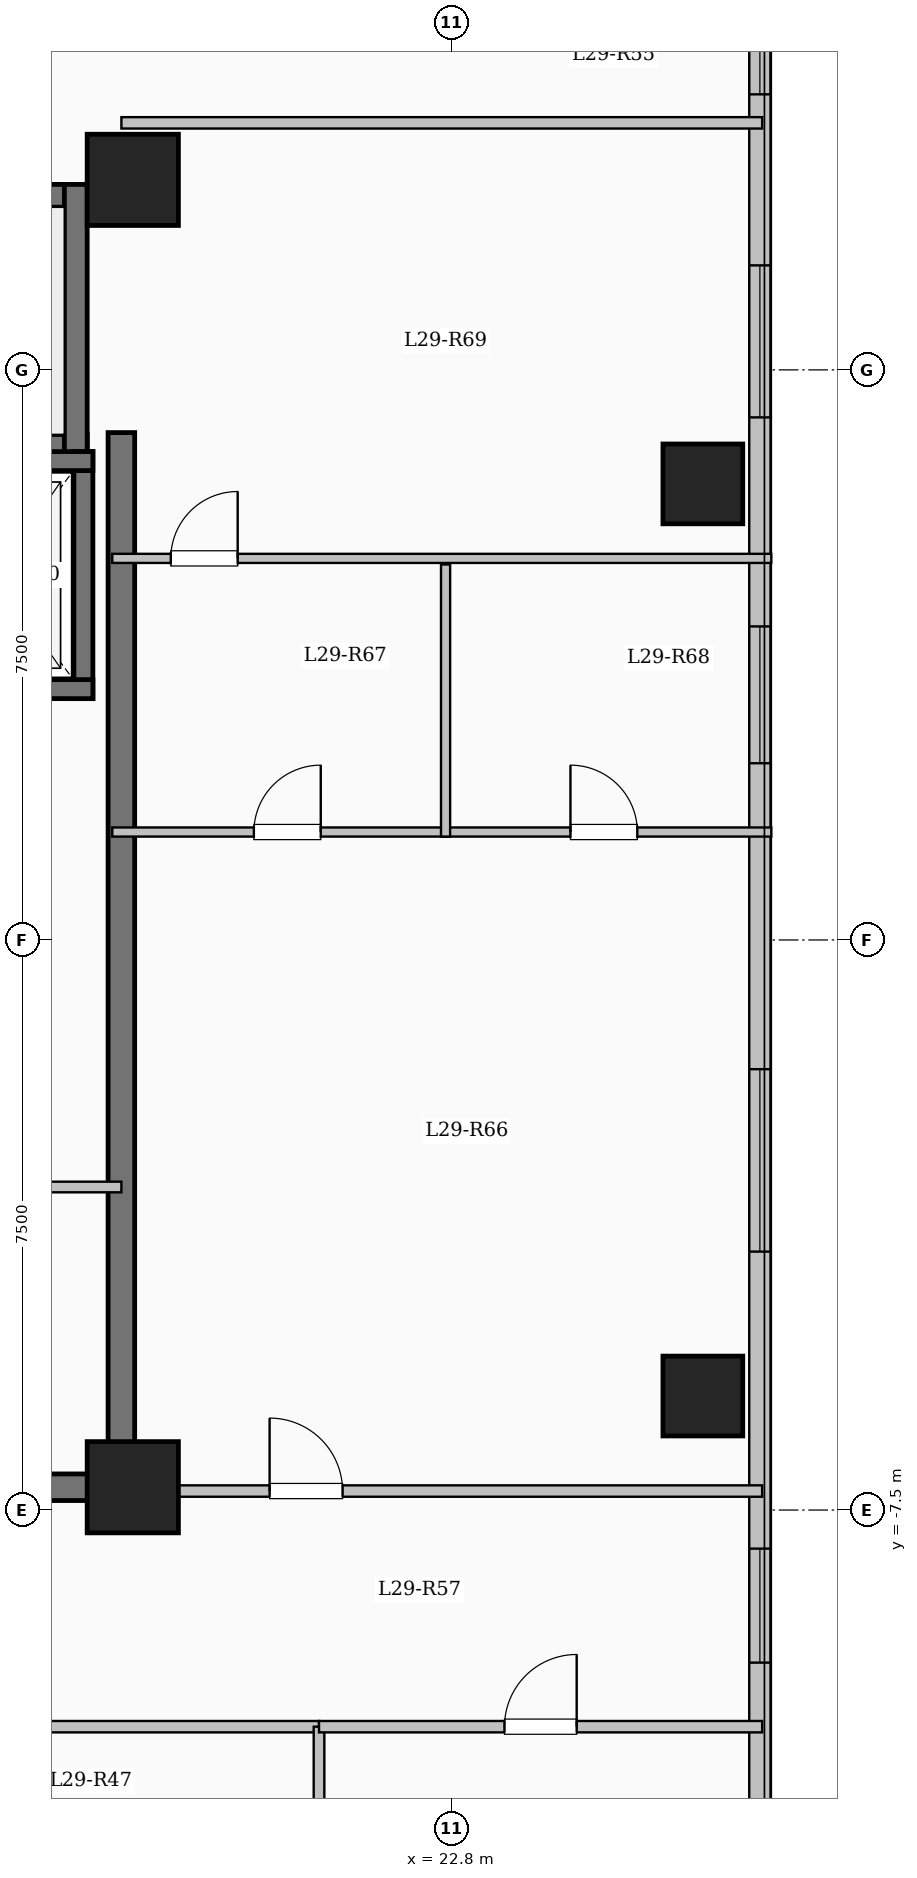
"""IFC4 building model, lengths in metres.
Left out: names, types, materials, properties, quantities, classifications, styles, units other than length and angle.
Written with IfcOpenShell. Run it as: python <this file> out.ifc"""

import sys

from ifc_helpers import new_model, si_unit, direction, frame, frame_2d, origin, origin_2d, place, context, subcontext, project, spatial, rectangle, extrude, element, fill, save


model = new_model("IFC4")
c1 = context("Model", 3, precision=1e-05, world=origin(), true_north=direction((0.0, 1.0)))
c2 = subcontext(c1, "Body", "Model", "MODEL_VIEW")
j1 = project(units=[si_unit("LENGTHUNIT", "METRE"), si_unit("PLANEANGLEUNIT", "RADIAN")], contexts=[c1])
p1 = place(None, origin())
s1 = spatial("IfcSite", under=j1, at=p1, CompositionType="ELEMENT")
p2 = place(p1, origin())
s2 = spatial("IfcBuilding", under=s1, at=p2, CompositionType="ELEMENT")
p3 = place(p2, frame((0.0, 0.0, 108.45)))
s3 = spatial("IfcBuildingStorey", under=s2, at=p3, CompositionType="ELEMENT", Elevation=108.45)
for number, where, z_axis, x_axis in (
    (1, (18.6, -7.2, 0.0), (0.0, 0.0, 1.0), (1.0, 0.0, 0.0)),
    (2, (18.6, 10.0, 0.0), (0.0, 0.0, 1.0), (1.0, 0.0, 0.0)),
):
    element("IfcColumn", number, at=place(p3, frame(where, z_axis=z_axis, x_axis=x_axis)), inside=s3, PredefinedType="COLUMN", context=c2, shape_type="SweptSolid", body=[
        extrude(rectangle(XDim=1.2, YDim=1.2, at=origin_2d()), origin(), (0.0, 0.0, 1.0), 3.35),
    ])
for number, where, z_axis, x_axis in (
    (3, (26.1, -6.0, 0.0), (0.0, 0.0, 1.0), (1.0, 0.0, 0.0)),
    (4, (26.1, 6.0, 0.0), (0.0, 0.0, 1.0), (1.0, 0.0, 0.0)),
):
    element("IfcColumn", number, at=place(p3, frame(where, z_axis=z_axis, x_axis=x_axis)), inside=s3, PredefinedType="COLUMN", context=c2, shape_type="SweptSolid", body=[
        extrude(rectangle(XDim=1.05, YDim=1.05, at=origin_2d()), origin(), (0.0, 0.0, 1.0), 3.35),
    ])
p4 = place(p3, frame((26.85, 17.85, 0.0), z_axis=(0.0, 0.0, 1.0), x_axis=(0.0, -1.0, 0.0)))
e5 = element("IfcWall", 5, at=p4, inside=s3, PredefinedType="SOLIDWALL", context=c2, shape_type="SweptSolid", body=[
    extrude(rectangle(XDim=35.7, YDim=0.28, at=frame_2d((17.85, 0.0))), origin(), (0.0, 0.0, 1.0), 3.1),
])
p5 = place(p4, frame((1.675, 0.0, 0.9)))
e6 = element("IfcOpeningElement", 6, at=p5, cuts=e5, PredefinedType="OPENING", context=c2, shape_type="SweptSolid", body=[
    extrude(rectangle(XDim=2.0, YDim=1.7, at=frame_2d((1.0, 0.85))), frame((0.0, 0.15, 0.0), z_axis=(0.0, -1.0, 0.0), x_axis=(1.0, 0.0, 0.0)), (0.0, 0.0, 1.0), 0.3),
])
p6 = place(p4, frame((5.725, 0.0, 0.95)))
e7 = element("IfcOpeningElement", 7, at=p6, cuts=e5, PredefinedType="OPENING", context=c2, shape_type="SweptSolid", body=[
    extrude(rectangle(XDim=1.0, YDim=1.5, at=frame_2d((0.5, 0.75))), frame((0.0, 0.15, 0.0), z_axis=(0.0, -1.0, 0.0), x_axis=(1.0, 0.0, 0.0)), (0.0, 0.0, 1.0), 0.3),
])
p7 = place(p4, frame((8.975, 0.0, 0.9)))
e8 = element("IfcOpeningElement", 8, at=p7, cuts=e5, PredefinedType="OPENING", context=c2, shape_type="SweptSolid", body=[
    extrude(rectangle(XDim=2.0, YDim=1.7, at=frame_2d((1.0, 0.85))), frame((0.0, 0.15, 0.0), z_axis=(0.0, -1.0, 0.0), x_axis=(1.0, 0.0, 0.0)), (0.0, 0.0, 1.0), 0.3),
])
p8 = place(p4, frame((13.725, 0.0, 0.9)))
e9 = element("IfcOpeningElement", 9, at=p8, cuts=e5, PredefinedType="OPENING", context=c2, shape_type="SweptSolid", body=[
    extrude(rectangle(XDim=1.8, YDim=1.65, at=frame_2d((0.9, 0.825))), frame((0.0, 0.15, 0.0), z_axis=(0.0, -1.0, 0.0), x_axis=(1.0, 0.0, 0.0)), (0.0, 0.0, 1.0), 0.3),
])
p9 = place(p4, frame((19.55, 0.0, 0.9)))
e10 = element("IfcOpeningElement", 10, at=p9, cuts=e5, PredefinedType="OPENING", context=c2, shape_type="SweptSolid", body=[
    extrude(rectangle(XDim=2.4, YDim=1.8, at=frame_2d((1.2, 0.9))), frame((0.0, 0.15, 0.0), z_axis=(0.0, -1.0, 0.0), x_axis=(1.0, 0.0, 0.0)), (0.0, 0.0, 1.0), 0.3),
])
p10 = place(p4, frame((25.857, 0.0, 0.9)))
e11 = element("IfcOpeningElement", 11, at=p10, cuts=e5, PredefinedType="OPENING", context=c2, shape_type="SweptSolid", body=[
    extrude(rectangle(XDim=1.5, YDim=1.65, at=frame_2d((0.75, 0.825))), frame((0.0, 0.15, 0.0), z_axis=(0.0, -1.0, 0.0), x_axis=(1.0, 0.0, 0.0)), (0.0, 0.0, 1.0), 0.3),
])
p11 = place(p4, frame((30.75, 0.0, 0.9)))
e12 = element("IfcOpeningElement", 12, at=p11, cuts=e5, PredefinedType="OPENING", context=c2, shape_type="SweptSolid", body=[
    extrude(rectangle(XDim=2.4, YDim=1.8, at=frame_2d((1.2, 0.9))), frame((0.0, 0.15, 0.0), z_axis=(0.0, -1.0, 0.0), x_axis=(1.0, 0.0, 0.0)), (0.0, 0.0, 1.0), 0.3),
])
p12 = place(p3, frame((10.0, 9.79, 0.0), z_axis=(0.0, 0.0, 1.0), x_axis=(1.0, 0.0, 0.0)))
e13 = element("IfcWall", 13, at=p12, inside=s3, PredefinedType="SHEAR", context=c2, shape_type="SweptSolid", body=[
    extrude(rectangle(XDim=8.0, YDim=0.3, at=frame_2d((4.0, 0.0))), origin(), (0.0, 0.0, 1.0), 3.35),
])
p13 = place(p3, frame((10.0, 6.5, 0.0), z_axis=(0.0, 0.0, 1.0), x_axis=(1.0, 0.0, 0.0)))
e14 = element("IfcWall", 14, at=p13, inside=s3, PredefinedType="SHEAR", context=c2, shape_type="SweptSolid", body=[
    extrude(rectangle(XDim=8.0, YDim=0.3, at=frame_2d((4.0, 0.0))), origin(), (0.0, 0.0, 1.0), 3.35),
])
p14 = place(p13, frame((0.55, 0.0, 0.0)))
e15 = element("IfcOpeningElement", 15, at=p14, cuts=e14, PredefinedType="OPENING", context=c2, shape_type="SweptSolid", body=[
    extrude(rectangle(XDim=1.0, YDim=2.15, at=frame_2d((0.5, 1.075))), frame((0.0, 0.16, 0.0), z_axis=(0.0, -1.0, 0.0), x_axis=(1.0, 0.0, 0.0)), (0.0, 0.0, 1.0), 0.32),
])
p15 = place(p3, frame((17.85, 6.35, 0.0), z_axis=(0.0, 0.0, 1.0), x_axis=(0.0, 1.0, 0.0)))
e16 = element("IfcWall", 16, at=p15, inside=s3, PredefinedType="SHEAR", context=c2, shape_type="SweptSolid", body=[
    extrude(rectangle(XDim=3.59, YDim=0.3, at=frame_2d((1.795, 0.0))), origin(), (0.0, 0.0, 1.0), 3.35),
])
p16 = place(p3, frame((17.95, 3.175, 0.0), z_axis=(0.0, 0.0, 1.0), x_axis=(0.0, 1.0, 0.0)))
e17 = element("IfcWall", 17, at=p16, inside=s3, PredefinedType="SHEAR", context=c2, shape_type="SweptSolid", body=[
    extrude(rectangle(XDim=3.25, YDim=0.25, at=frame_2d((1.625, 0.0))), origin(), (0.0, 0.0, 1.0), 3.35),
])
for number, where, z_axis, x_axis in (
    (18, (15.525, 3.3, 0.0), (0.0, 0.0, 1.0), (1.0, 0.0, 0.0)),
    (19, (15.525, 6.3, 0.0), (0.0, 0.0, 1.0), (1.0, 0.0, 0.0)),
):
    element("IfcWall", number, at=place(p3, frame(where, z_axis=z_axis, x_axis=x_axis)), inside=s3, PredefinedType="SHEAR", context=c2, shape_type="SweptSolid", body=[
        extrude(rectangle(XDim=2.55, YDim=0.25, at=frame_2d((1.275, 0.0))), origin(), (0.0, 0.0, 1.0), 3.35),
    ])
p17 = place(p3, frame((18.45, -7.375, 0.0), z_axis=(0.0, 0.0, 1.0), x_axis=(0.0, 1.0, 0.0)))
e20 = element("IfcWall", 20, at=p17, inside=s3, PredefinedType="SHEAR", context=c2, shape_type="SweptSolid", body=[
    extrude(rectangle(XDim=14.05, YDim=0.35, at=frame_2d((7.025, 0.0))), origin(), (0.0, 0.0, 1.0), 3.35),
])
p18 = place(p3, frame((10.075, -7.2, 0.0), z_axis=(0.0, 0.0, 1.0), x_axis=(1.0, 0.0, 0.0)))
e21 = element("IfcWall", 21, at=p18, inside=s3, PredefinedType="SHEAR", context=c2, shape_type="SweptSolid", body=[
    extrude(rectangle(XDim=8.55, YDim=0.35, at=frame_2d((4.275, 0.0))), origin(), (0.0, 0.0, 1.0), 3.35),
])
p19 = place(p3, frame((15.4, -3.25, 0.0), z_axis=(0.0, 0.0, 1.0), x_axis=(1.0, 0.0, 0.0)))
e22 = element("IfcWall", 22, at=p19, inside=s3, PredefinedType="PARTITIONING", context=c2, shape_type="SweptSolid", body=[
    extrude(rectangle(XDim=3.05, YDim=0.14, at=frame_2d((1.525, 0.0))), origin(), (0.0, 0.0, 1.0), 3.1),
])
p20 = place(p19, frame((1.05, 0.0, 0.0)))
e23 = element("IfcOpeningElement", 23, at=p20, cuts=e22, PredefinedType="OPENING", context=c2, shape_type="SweptSolid", body=[
    extrude(rectangle(XDim=0.9, YDim=2.08, at=frame_2d((0.45, 1.04))), frame((0.0, 0.08, 0.0), z_axis=(0.0, -1.0, 0.0), x_axis=(1.0, 0.0, 0.0)), (0.0, 0.0, 1.0), 0.16),
])
p21 = place(p3, frame((8.55, -10.35, 0.0), z_axis=(0.0, 0.0, 1.0), x_axis=(1.0, 0.0, 0.0)))
e24 = element("IfcWall", 24, at=p21, inside=s3, PredefinedType="PARTITIONING", context=c2, shape_type="SweptSolid", body=[
    extrude(rectangle(XDim=12.5, YDim=0.15, at=frame_2d((6.25, 0.0))), origin(), (0.0, 0.0, 1.0), 3.1),
])
p22 = place(p21, frame((0.75, 0.0, 0.0)))
e25 = element("IfcOpeningElement", 25, at=p22, cuts=e24, PredefinedType="OPENING", context=c2, shape_type="SweptSolid", body=[
    extrude(rectangle(XDim=0.96, YDim=2.15, at=frame_2d((0.48, 1.075))), frame((0.0, 0.085, 0.0), z_axis=(0.0, -1.0, 0.0), x_axis=(1.0, 0.0, 0.0)), (0.0, 0.0, 1.0), 0.17),
])
p23 = place(p3, frame((18.45, -7.25, 0.0), z_axis=(0.0, 0.0, 1.0), x_axis=(1.0, 0.0, 0.0)))
e26 = element("IfcWall", 26, at=p23, inside=s3, PredefinedType="PARTITIONING", context=c2, shape_type="SweptSolid", body=[
    extrude(rectangle(XDim=8.43, YDim=0.15, at=frame_2d((4.215, 0.0))), origin(), (0.0, 0.0, 1.0), 3.1),
])
p24 = place(p23, frame((1.95, 0.0, 0.0)))
e27 = element("IfcOpeningElement", 27, at=p24, cuts=e26, PredefinedType="OPENING", context=c2, shape_type="SweptSolid", body=[
    extrude(rectangle(XDim=0.96, YDim=2.15, at=frame_2d((0.48, 1.075))), frame((0.0, 0.085, 0.0), z_axis=(0.0, -1.0, 0.0), x_axis=(1.0, 0.0, 0.0)), (0.0, 0.0, 1.0), 0.17),
])
p25 = place(p3, frame((18.45, 10.75, 0.0), z_axis=(0.0, 0.0, 1.0), x_axis=(1.0, 0.0, 0.0)))
e28 = element("IfcWall", 28, at=p25, inside=s3, PredefinedType="PARTITIONING", context=c2, shape_type="SweptSolid", body=[
    extrude(rectangle(XDim=8.43, YDim=0.15, at=frame_2d((4.215, 0.0))), origin(), (0.0, 0.0, 1.0), 3.1),
])
p26 = place(p3, frame((21.05, -17.85, 0.0), z_axis=(0.0, 0.0, 1.0), x_axis=(0.0, 1.0, 0.0)))
e29 = element("IfcWall", 29, at=p26, inside=s3, PredefinedType="PARTITIONING", context=c2, shape_type="SweptSolid", body=[
    extrude(rectangle(XDim=7.5, YDim=0.14, at=frame_2d((3.75, 0.0))), origin(), (0.0, 0.0, 1.0), 3.1),
])
p27 = place(p3, frame((21.05, -10.35, 0.0), z_axis=(0.0, 0.0, 1.0), x_axis=(1.0, 0.0, 0.0)))
e30 = element("IfcWall", 30, at=p27, inside=s3, PredefinedType="PARTITIONING", context=c2, shape_type="SweptSolid", body=[
    extrude(rectangle(XDim=5.83, YDim=0.15, at=frame_2d((2.915, 0.0))), origin(), (0.0, 0.0, 1.0), 3.1),
])
p28 = place(p27, frame((2.44, 0.0, 0.0)))
e31 = element("IfcOpeningElement", 31, at=p28, cuts=e30, PredefinedType="OPENING", context=c2, shape_type="SweptSolid", body=[
    extrude(rectangle(XDim=0.95, YDim=2.15, at=frame_2d((0.475, 1.075))), frame((0.0, 0.085, 0.0), z_axis=(0.0, -1.0, 0.0), x_axis=(1.0, 0.0, 0.0)), (0.0, 0.0, 1.0), 0.17),
])
p29 = place(p3, frame((18.33, 1.42, 0.0), z_axis=(0.0, 0.0, 1.0), x_axis=(1.0, 0.0, 0.0)))
e32 = element("IfcWall", 32, at=p29, inside=s3, PredefinedType="PARTITIONING", context=c2, shape_type="SweptSolid", body=[
    extrude(rectangle(XDim=8.67, YDim=0.12, at=frame_2d((4.335, 0.0))), origin(), (0.0, 0.0, 1.0), 3.1),
])
p30 = place(p29, frame((1.863, 0.0, 0.0)))
e33 = element("IfcOpeningElement", 33, at=p30, cuts=e32, PredefinedType="OPENING", context=c2, shape_type="SweptSolid", body=[
    extrude(rectangle(XDim=0.88, YDim=2.1, at=frame_2d((0.44, 1.05))), frame((0.0, 0.07, 0.0), z_axis=(0.0, -1.0, 0.0), x_axis=(1.0, 0.0, 0.0)), (0.0, 0.0, 1.0), 0.14),
])
p31 = place(p29, frame((6.028, 0.0, 0.0)))
e34 = element("IfcOpeningElement", 34, at=p31, cuts=e32, PredefinedType="OPENING", context=c2, shape_type="SweptSolid", body=[
    extrude(rectangle(XDim=0.88, YDim=2.1, at=frame_2d((0.44, 1.05))), frame((0.0, 0.07, 0.0), z_axis=(0.0, -1.0, 0.0), x_axis=(1.0, 0.0, 0.0)), (0.0, 0.0, 1.0), 0.14),
])
p32 = place(p3, frame((18.33, 5.02, 0.0), z_axis=(0.0, 0.0, 1.0), x_axis=(1.0, 0.0, 0.0)))
e35 = element("IfcWall", 35, at=p32, inside=s3, PredefinedType="PARTITIONING", context=c2, shape_type="SweptSolid", body=[
    extrude(rectangle(XDim=8.67, YDim=0.12, at=frame_2d((4.335, 0.0))), origin(), (0.0, 0.0, 1.0), 3.1),
])
p33 = place(p32, frame((0.77, 0.0, 0.0)))
e36 = element("IfcOpeningElement", 36, at=p33, cuts=e35, PredefinedType="OPENING", context=c2, shape_type="SweptSolid", body=[
    extrude(rectangle(XDim=0.88, YDim=2.1, at=frame_2d((0.44, 1.05))), frame((0.0, 0.07, 0.0), z_axis=(0.0, -1.0, 0.0), x_axis=(1.0, 0.0, 0.0)), (0.0, 0.0, 1.0), 0.14),
])
p34 = place(p3, frame((22.715, 1.36, 0.0), z_axis=(0.0, 0.0, 1.0), x_axis=(0.0, 1.0, 0.0)))
e37 = element("IfcWall", 37, at=p34, inside=s3, PredefinedType="PARTITIONING", context=c2, shape_type="SweptSolid", body=[
    extrude(rectangle(XDim=3.58, YDim=0.12, at=frame_2d((1.79, 0.0))), origin(), (0.0, 0.0, 1.0), 3.1),
])
p35 = place(p6, origin())
e38 = element("IfcWindow", 38, at=p35, inside=s3, PartitioningType="SINGLE_PANEL", PredefinedType="WINDOW", context=c2, shape_type="SweptSolid", body=[
    extrude(rectangle(XDim=1.0, YDim=1.5, at=frame_2d((0.5, 0.75))), frame((0.0, 0.03, 0.0), z_axis=(0.0, -1.0, 0.0), x_axis=(1.0, 0.0, 0.0)), (0.0, 0.0, 1.0), 0.06),
])
fill(e7, e38)
p36 = place(p7, origin())
e39 = element("IfcWindow", 39, at=p36, inside=s3, PartitioningType="SINGLE_PANEL", PredefinedType="WINDOW", context=c2, shape_type="SweptSolid", body=[
    extrude(rectangle(XDim=2.0, YDim=1.7, at=frame_2d((1.0, 0.85))), frame((0.0, 0.03, 0.0), z_axis=(0.0, -1.0, 0.0), x_axis=(1.0, 0.0, 0.0)), (0.0, 0.0, 1.0), 0.06),
])
fill(e8, e39)
p37 = place(p8, origin())
e40 = element("IfcWindow", 40, at=p37, inside=s3, PartitioningType="SINGLE_PANEL", PredefinedType="WINDOW", context=c2, shape_type="SweptSolid", body=[
    extrude(rectangle(XDim=1.8, YDim=1.65, at=frame_2d((0.9, 0.825))), frame((0.0, 0.03, 0.0), z_axis=(0.0, -1.0, 0.0), x_axis=(1.0, 0.0, 0.0)), (0.0, 0.0, 1.0), 0.06),
])
fill(e9, e40)
p38 = place(p9, origin())
e41 = element("IfcWindow", 41, at=p38, inside=s3, PartitioningType="SINGLE_PANEL", PredefinedType="WINDOW", context=c2, shape_type="SweptSolid", body=[
    extrude(rectangle(XDim=2.4, YDim=1.8, at=frame_2d((1.2, 0.9))), frame((0.0, 0.03, 0.0), z_axis=(0.0, -1.0, 0.0), x_axis=(1.0, 0.0, 0.0)), (0.0, 0.0, 1.0), 0.06),
])
fill(e10, e41)
p39 = place(p10, origin())
e42 = element("IfcWindow", 42, at=p39, inside=s3, PartitioningType="SINGLE_PANEL", PredefinedType="WINDOW", context=c2, shape_type="SweptSolid", body=[
    extrude(rectangle(XDim=1.5, YDim=1.65, at=frame_2d((0.75, 0.825))), frame((0.0, 0.03, 0.0), z_axis=(0.0, -1.0, 0.0), x_axis=(1.0, 0.0, 0.0)), (0.0, 0.0, 1.0), 0.06),
])
fill(e11, e42)
p40 = place(p28, origin())
e43 = element("IfcDoor", 43, at=p40, inside=s3, OperationType="SINGLE_SWING_RIGHT", PredefinedType="DOOR", context=c2, shape_type="SweptSolid", body=[
    extrude(rectangle(XDim=0.95, YDim=2.15, at=frame_2d((0.475, 1.075))), frame((0.0, 0.025, 0.0), z_axis=(0.0, -1.0, 0.0), x_axis=(1.0, 0.0, 0.0)), (0.0, 0.0, 1.0), 0.05),
])
fill(e31, e43)
p41 = place(p24, origin())
e44 = element("IfcDoor", 44, at=p41, inside=s3, OperationType="SINGLE_SWING_LEFT", PredefinedType="DOOR", context=c2, shape_type="SweptSolid", body=[
    extrude(rectangle(XDim=0.96, YDim=2.15, at=frame_2d((0.48, 1.075))), frame((0.0, 0.025, 0.0), z_axis=(0.0, -1.0, 0.0), x_axis=(1.0, 0.0, 0.0)), (0.0, 0.0, 1.0), 0.05),
])
fill(e27, e44)
p42 = place(p30, origin())
e45 = element("IfcDoor", 45, at=p42, inside=s3, OperationType="SINGLE_SWING_RIGHT", PredefinedType="DOOR", context=c2, shape_type="SweptSolid", body=[
    extrude(rectangle(XDim=0.88, YDim=2.1, at=frame_2d((0.44, 1.05))), frame((0.0, 0.025, 0.0), z_axis=(0.0, -1.0, 0.0), x_axis=(1.0, 0.0, 0.0)), (0.0, 0.0, 1.0), 0.05),
])
fill(e33, e45)
p43 = place(p31, origin())
e46 = element("IfcDoor", 46, at=p43, inside=s3, OperationType="SINGLE_SWING_LEFT", PredefinedType="DOOR", context=c2, shape_type="SweptSolid", body=[
    extrude(rectangle(XDim=0.88, YDim=2.1, at=frame_2d((0.44, 1.05))), frame((0.0, 0.025, 0.0), z_axis=(0.0, -1.0, 0.0), x_axis=(1.0, 0.0, 0.0)), (0.0, 0.0, 1.0), 0.05),
])
fill(e34, e46)
p44 = place(p33, origin())
e47 = element("IfcDoor", 47, at=p44, inside=s3, OperationType="SINGLE_SWING_RIGHT", PredefinedType="DOOR", context=c2, shape_type="SweptSolid", body=[
    extrude(rectangle(XDim=0.88, YDim=2.1, at=frame_2d((0.44, 1.05))), frame((0.0, 0.025, 0.0), z_axis=(0.0, -1.0, 0.0), x_axis=(1.0, 0.0, 0.0)), (0.0, 0.0, 1.0), 0.05),
])
fill(e36, e47)
save(model, sys.argv[1])
